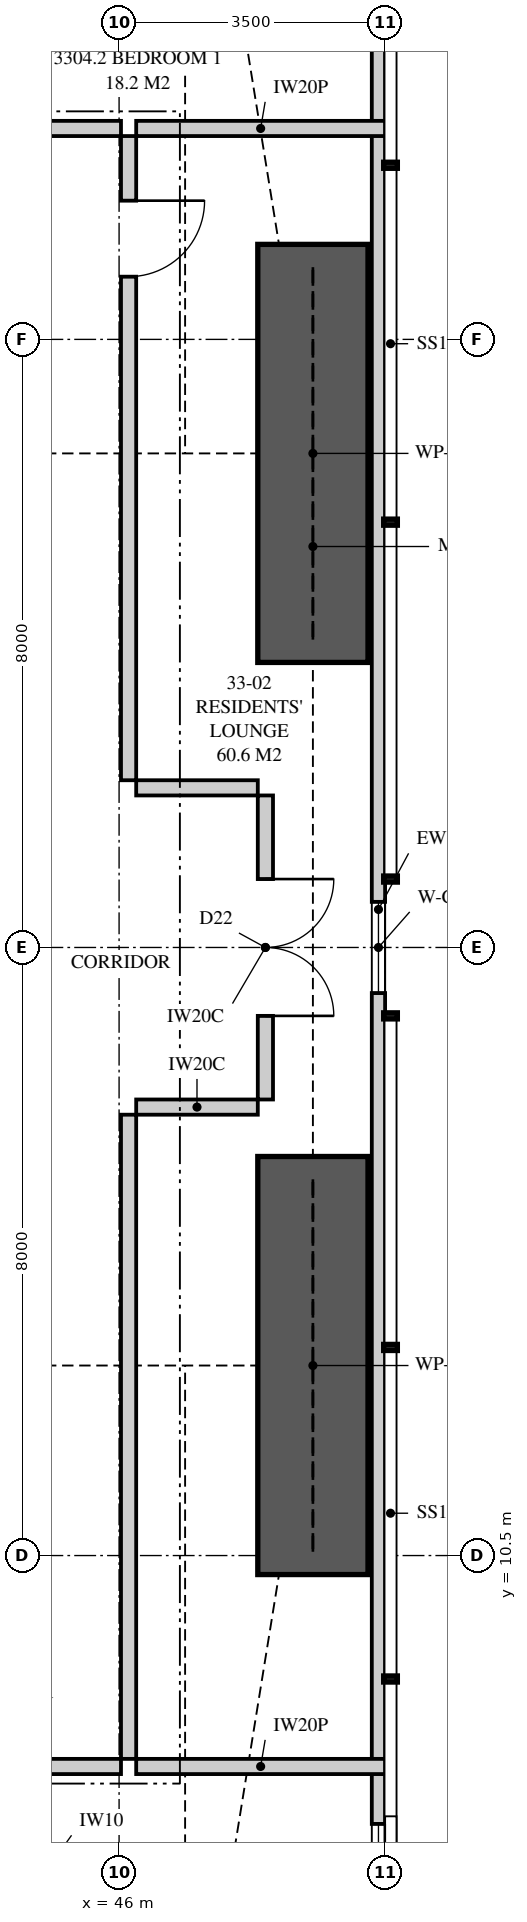
"""IFC4 building model, lengths in metres.
Left out: names, types, materials, properties, quantities, classifications, styles, units other than length and angle.
Written with IfcOpenShell. Run it as: python <this file> out.ifc"""

import sys

from ifc_helpers import new_model, si_unit, direction, frame, frame_2d, origin, place, context, subcontext, project, spatial, polyline, rectangle, outline, extrude, element, fill, save


model = new_model("IFC4")
c1 = context("Model", 3, precision=1e-05, world=origin(), true_north=direction((0.0, 1.0)))
c2 = subcontext(c1, "Body", "Model", "MODEL_VIEW")
j1 = project(units=[si_unit("LENGTHUNIT", "METRE"), si_unit("PLANEANGLEUNIT", "RADIAN")], contexts=[c1])
p1 = place(None, origin())
s1 = spatial("IfcSite", under=j1, at=p1, CompositionType="ELEMENT")
p2 = place(p1, origin())
s2 = spatial("IfcBuilding", under=s1, at=p2, CompositionType="ELEMENT")
p3 = place(p2, frame((0.0, 0.0, 121.6)))
s3 = spatial("IfcBuildingStorey", under=s2, at=p3, CompositionType="ELEMENT", Elevation=121.6)
p4 = place(p3, frame((49.413, 3.051, 0.0), z_axis=(0.0, 0.0, 1.0), x_axis=(0.0, 1.0, 0.0)))
e1 = element("IfcWall", 1, at=p4, inside=s3, PredefinedType="SOLIDWALL", context=c2, shape_type="SweptSolid", body=[
    extrude(outline(polyline([(0.0, 0.0), (31.897, 0.0), (31.897, 3.11), (22.167, 3.11), (22.167, 2.15), (22.074, 2.15), (22.074, 3.11), (21.949, 3.11), (21.949, 2.15), (9.949, 2.15), (9.949, 3.11), (9.823, 3.11), (9.823, 2.15), (9.73, 2.15), (9.73, 3.11), (0.0, 3.11), (0.0, 0.0)])), frame((0.0, 0.087, 0.0), z_axis=(0.0, -1.0, 0.0), x_axis=(1.0, 0.0, 0.0)), (0.0, 0.0, 1.0), 0.175),
])
p5 = place(p4, frame((2.118, 0.0, 0.4)))
e2 = element("IfcOpeningElement", 2, at=p5, cuts=e1, PredefinedType="OPENING", context=c2, shape_type="SweptSolid", body=[
    extrude(rectangle(XDim=1.8, YDim=1.7, at=frame_2d((0.9, 0.85))), frame((0.0, 0.097, 0.0), z_axis=(0.0, -1.0, 0.0), x_axis=(1.0, 0.0, 0.0)), (0.0, 0.0, 1.0), 0.195),
])
p6 = place(p4, frame((14.849, 0.0, 0.4)))
e3 = element("IfcOpeningElement", 3, at=p6, cuts=e1, PredefinedType="OPENING", context=c2, shape_type="SweptSolid", body=[
    extrude(rectangle(XDim=1.2, YDim=1.7, at=frame_2d((0.6, 0.85))), frame((0.0, 0.097, 0.0), z_axis=(0.0, -1.0, 0.0), x_axis=(1.0, 0.0, 0.0)), (0.0, 0.0, 1.0), 0.195),
])
p7 = place(p4, frame((27.479, 0.0, 0.4)))
e4 = element("IfcOpeningElement", 4, at=p7, cuts=e1, PredefinedType="OPENING", context=c2, shape_type="SweptSolid", body=[
    extrude(rectangle(XDim=1.8, YDim=1.7, at=frame_2d((0.9, 0.85))), frame((0.0, 0.097, 0.0), z_axis=(0.0, -1.0, 0.0), x_axis=(1.0, 0.0, 0.0)), (0.0, 0.0, 1.0), 0.195),
])
p8 = place(p3, frame((37.2, 7.725, 0.0), z_axis=(0.0, 0.0, 1.0), x_axis=(1.0, 0.0, 0.0)))
e5 = element("IfcWall", 5, at=p8, inside=s3, PredefinedType="PARTITIONING", context=c2, shape_type="SweptSolid", body=[
    extrude(outline(polyline([(0.0, 0.0), (8.825, 0.0), (8.825, 3.11), (1.762, 3.11), (1.762, 2.541), (1.088, 2.541), (1.088, 3.11), (0.0, 3.11), (0.0, 0.0)])), frame((0.0, 0.1, 0.0), z_axis=(0.0, -1.0, 0.0), x_axis=(1.0, 0.0, 0.0)), (0.0, 0.0, 1.0), 0.2),
])
p9 = place(p8, frame((2.4, 0.0, 0.0)))
e6 = element("IfcOpeningElement", 6, at=p9, cuts=e5, PredefinedType="OPENING", context=c2, shape_type="SweptSolid", body=[
    extrude(rectangle(XDim=1.05, YDim=2.2, at=frame_2d((0.525, 1.1))), frame((0.0, 0.11, 0.0), z_axis=(0.0, -1.0, 0.0), x_axis=(1.0, 0.0, 0.0)), (0.0, 0.0, 1.0), 0.22),
])
p10 = place(p3, frame((46.225, 7.725, 0.0), z_axis=(0.0, 0.0, 1.0), x_axis=(1.0, 0.0, 0.0)))
e7 = element("IfcWall", 7, at=p10, inside=s3, PredefinedType="PARTITIONING", context=c2, shape_type="SweptSolid", body=[
    extrude(outline(polyline([(0.0, 0.0), (3.275, 0.0), (3.275, 3.11), (2.392, 3.11), (2.392, 2.15), (0.643, 2.15), (0.643, 2.541), (0.306, 2.541), (0.306, 3.11), (0.0, 3.11), (0.0, 0.0)])), frame((0.0, 0.1, 0.0), z_axis=(0.0, -1.0, 0.0), x_axis=(1.0, 0.0, 0.0)), (0.0, 0.0, 1.0), 0.2),
])
p11 = place(p3, frame((36.9, 29.275, 0.0), z_axis=(0.0, 0.0, 1.0), x_axis=(1.0, 0.0, 0.0)))
e8 = element("IfcWall", 8, at=p11, inside=s3, PredefinedType="PARTITIONING", context=c2, shape_type="SweptSolid", body=[
    extrude(outline(polyline([(0.0, 0.0), (9.125, 0.0), (9.125, 3.11), (2.062, 3.11), (2.062, 2.541), (1.388, 2.541), (1.388, 3.11), (0.0, 3.11), (0.0, 0.0)])), frame((0.0, 0.1, 0.0), z_axis=(0.0, -1.0, 0.0), x_axis=(1.0, 0.0, 0.0)), (0.0, 0.0, 1.0), 0.2),
])
p12 = place(p11, frame((4.3, 0.0, 0.0)))
e9 = element("IfcOpeningElement", 9, at=p12, cuts=e8, PredefinedType="OPENING", context=c2, shape_type="SweptSolid", body=[
    extrude(rectangle(XDim=1.05, YDim=2.2, at=frame_2d((0.525, 1.1))), frame((0.0, 0.11, 0.0), z_axis=(0.0, -1.0, 0.0), x_axis=(1.0, 0.0, 0.0)), (0.0, 0.0, 1.0), 0.22),
])
p13 = place(p3, frame((46.225, 29.275, 0.0), z_axis=(0.0, 0.0, 1.0), x_axis=(1.0, 0.0, 0.0)))
e10 = element("IfcWall", 10, at=p13, inside=s3, PredefinedType="PARTITIONING", context=c2, shape_type="SweptSolid", body=[
    extrude(outline(polyline([(0.0, 0.0), (3.275, 0.0), (3.275, 3.11), (2.554, 3.11), (2.554, 2.15), (0.805, 2.15), (0.805, 2.541), (0.306, 2.541), (0.306, 3.11), (0.0, 3.11), (0.0, 0.0)])), frame((0.0, 0.1, 0.0), z_axis=(0.0, -1.0, 0.0), x_axis=(1.0, 0.0, 0.0)), (0.0, 0.0, 1.0), 0.2),
])
p14 = place(p3, frame((46.125, 7.825, 0.0), z_axis=(0.0, 0.0, 1.0), x_axis=(0.0, 1.0, 0.0)))
e11 = element("IfcWall", 11, at=p14, inside=s3, PredefinedType="PARTITIONING", context=c2, shape_type="SweptSolid", body=[
    extrude(outline(polyline([(0.0, 0.0), (8.475, 0.0), (8.475, 3.11), (5.512, 3.11), (5.512, 2.541), (4.838, 2.541), (4.838, 3.11), (0.0, 3.11), (0.0, 0.0)])), frame((0.0, 0.1, 0.0), z_axis=(0.0, -1.0, 0.0), x_axis=(1.0, 0.0, 0.0)), (0.0, 0.0, 1.0), 0.2),
])
p15 = place(p3, frame((46.125, 20.7, 0.0), z_axis=(0.0, 0.0, 1.0), x_axis=(0.0, 1.0, 0.0)))
e12 = element("IfcWall", 12, at=p15, inside=s3, PredefinedType="PARTITIONING", context=c2, shape_type="SweptSolid", body=[
    extrude(outline(polyline([(0.0, 0.0), (8.475, 0.0), (8.475, 3.11), (4.637, 3.11), (4.637, 2.541), (3.963, 2.541), (3.963, 3.11), (0.0, 3.11), (0.0, 0.0)])), frame((0.0, 0.1, 0.0), z_axis=(0.0, -1.0, 0.0), x_axis=(1.0, 0.0, 0.0)), (0.0, 0.0, 1.0), 0.2),
])
p16 = place(p15, frame((6.625, 0.0, 0.0)))
e13 = element("IfcOpeningElement", 13, at=p16, cuts=e12, PredefinedType="OPENING", context=c2, shape_type="SweptSolid", body=[
    extrude(rectangle(XDim=1.0, YDim=2.1, at=frame_2d((0.5, 1.05))), frame((0.0, 0.11, 0.0), z_axis=(0.0, -1.0, 0.0), x_axis=(1.0, 0.0, 0.0)), (0.0, 0.0, 1.0), 0.22),
])
p17 = place(p3, frame((47.925, 16.5, 0.0), z_axis=(0.0, 0.0, 1.0), x_axis=(0.0, 1.0, 0.0)))
e14 = element("IfcWall", 14, at=p17, inside=s3, PredefinedType="PARTITIONING", context=c2, shape_type="SweptSolid", body=[
    extrude(outline(polyline([(0.0, 0.0), (4.0, 0.0), (4.0, 3.11), (4.0, 2.15), (0.0, 2.15), (0.0, 3.11), (0.0, 0.0)])), frame((0.0, 0.1, 0.0), z_axis=(0.0, -1.0, 0.0), x_axis=(1.0, 0.0, 0.0)), (0.0, 0.0, 1.0), 0.2),
])
p18 = place(p17, frame((1.1, 0.0, 0.0)))
e15 = element("IfcOpeningElement", 15, at=p18, cuts=e14, PredefinedType="OPENING", context=c2, shape_type="SweptSolid", body=[
    extrude(rectangle(XDim=1.8, YDim=2.1, at=frame_2d((0.9, 1.05))), frame((0.0, 0.11, 0.0), z_axis=(0.0, -1.0, 0.0), x_axis=(1.0, 0.0, 0.0)), (0.0, 0.0, 1.0), 0.22),
])
for number, where, z_axis, x_axis in (
    (16, (46.225, 16.4, 0.0), (0.0, 0.0, 1.0), (1.0, 0.0, 0.0)),
    (17, (46.225, 20.6, 0.0), (0.0, 0.0, 1.0), (1.0, 0.0, 0.0)),
):
    element("IfcWall", number, at=place(p3, frame(where, z_axis=z_axis, x_axis=x_axis)), inside=s3, PredefinedType="PARTITIONING", context=c2, shape_type="SweptSolid", body=[
        extrude(outline(polyline([(0.0, 0.0), (1.6, 0.0), (1.6, 3.11), (1.6, 2.15), (1.415, 2.15), (1.415, 3.11), (0.0, 3.11), (0.0, 0.0)])), frame((0.0, 0.1, 0.0), z_axis=(0.0, -1.0, 0.0), x_axis=(1.0, 0.0, 0.0)), (0.0, 0.0, 1.0), 0.2),
    ])
for number, where, z_axis, x_axis in (
    (18, (48.55, 10.25, 0.0), (0.0, 0.0, 1.0), (0.0, 1.0, 0.0)),
    (19, (48.55, 22.25, 0.0), (0.0, 0.0, 1.0), (0.0, 1.0, 0.0)),
):
    element("IfcWall", number, at=place(p3, frame(where, z_axis=z_axis, x_axis=x_axis)), inside=s3, PredefinedType="SHEAR", context=c2, shape_type="SweptSolid", body=[
        extrude(rectangle(XDim=5.5, YDim=1.45, at=frame_2d((2.75, 0.0))), origin(), (0.0, 0.0, 1.0), 3.35),
    ])
p19 = place(p5, origin())
e20 = element("IfcWindow", 20, at=p19, inside=s3, PartitioningType="SINGLE_PANEL", PredefinedType="WINDOW", context=c2, shape_type="SweptSolid", body=[
    extrude(rectangle(XDim=1.8, YDim=1.7, at=frame_2d((0.9, 0.85))), frame((0.0, 0.03, 0.0), z_axis=(0.0, -1.0, 0.0), x_axis=(1.0, 0.0, 0.0)), (0.0, 0.0, 1.0), 0.06),
])
fill(e2, e20)
p20 = place(p6, origin())
e21 = element("IfcWindow", 21, at=p20, inside=s3, PartitioningType="SINGLE_PANEL", PredefinedType="WINDOW", context=c2, shape_type="SweptSolid", body=[
    extrude(rectangle(XDim=1.2, YDim=1.7, at=frame_2d((0.6, 0.85))), frame((0.0, 0.03, 0.0), z_axis=(0.0, -1.0, 0.0), x_axis=(1.0, 0.0, 0.0)), (0.0, 0.0, 1.0), 0.06),
])
fill(e3, e21)
p21 = place(p18, frame((1.8, 0.0, 0.0), z_axis=(0.0, 0.0, 1.0), x_axis=(-1.0, 0.0, 0.0)))
e22 = element("IfcDoor", 22, at=p21, inside=s3, OperationType="DOUBLE_DOOR_SINGLE_SWING", PredefinedType="DOOR", context=c2, shape_type="SweptSolid", body=[
    extrude(rectangle(XDim=1.8, YDim=2.1, at=frame_2d((0.9, 1.05))), frame((0.0, 0.025, 0.0), z_axis=(0.0, -1.0, 0.0), x_axis=(1.0, 0.0, 0.0)), (0.0, 0.0, 1.0), 0.05),
])
fill(e15, e22)
p22 = place(p16, frame((1.0, 0.0, 0.0), z_axis=(0.0, 0.0, 1.0), x_axis=(-1.0, 0.0, 0.0)))
e23 = element("IfcDoor", 23, at=p22, inside=s3, OperationType="SINGLE_SWING_LEFT", PredefinedType="DOOR", context=c2, shape_type="SweptSolid", body=[
    extrude(rectangle(XDim=1.0, YDim=2.1, at=frame_2d((0.5, 1.05))), frame((0.0, 0.025, 0.0), z_axis=(0.0, -1.0, 0.0), x_axis=(1.0, 0.0, 0.0)), (0.0, 0.0, 1.0), 0.05),
])
fill(e13, e23)
save(model, sys.argv[1])
